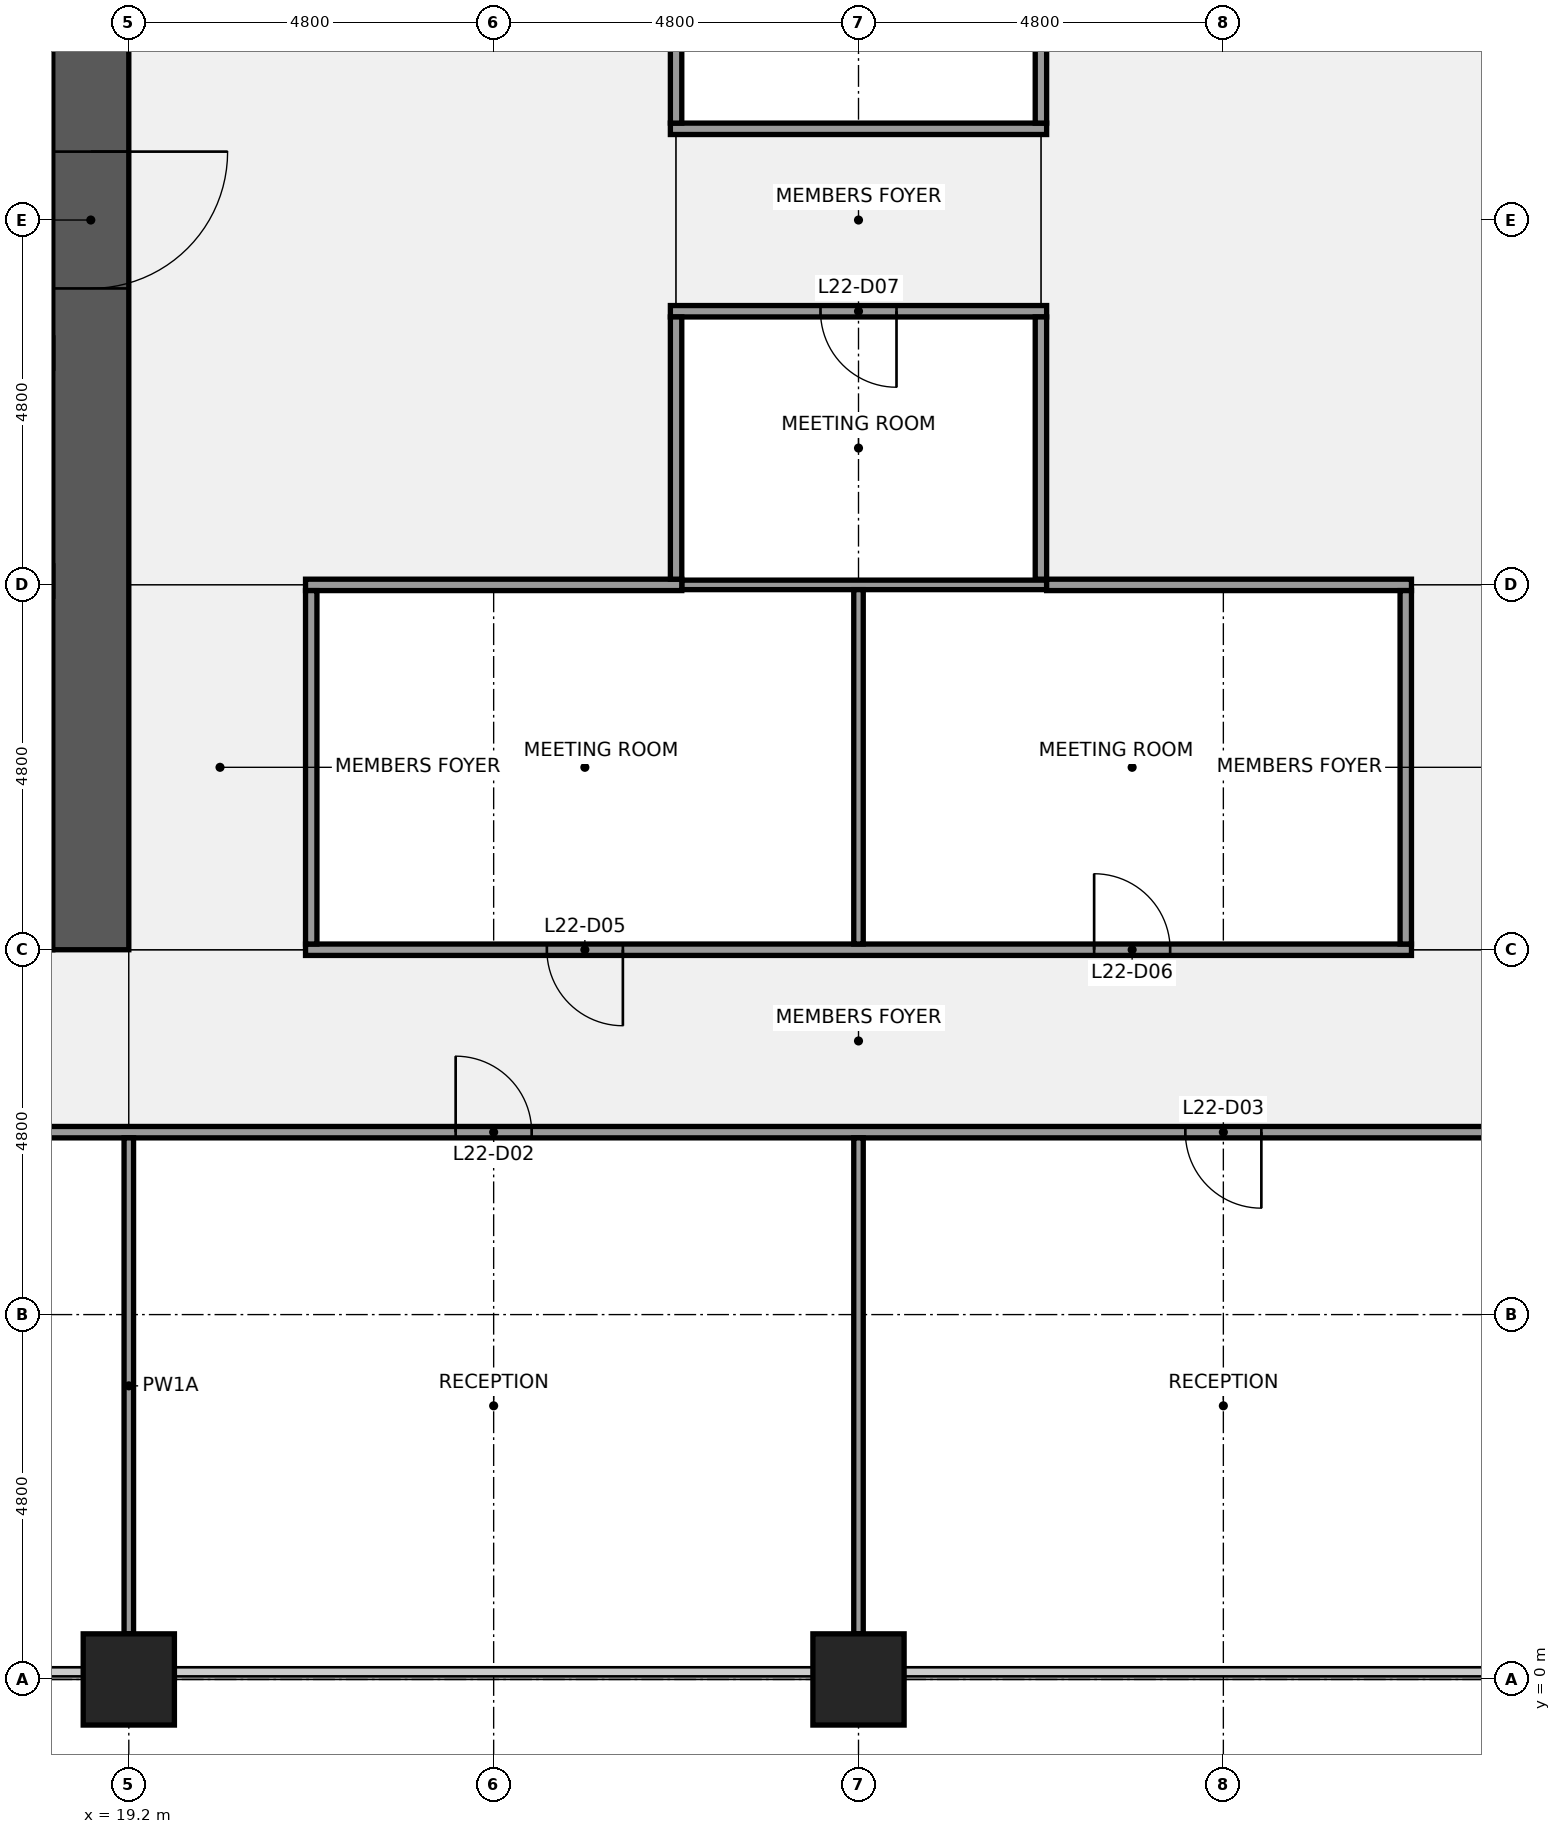
"""IFC4 building model, lengths in metres.
Left out: names, types, materials, properties, quantities, classifications, styles, units other than length and angle.
Written with IfcOpenShell. Run it as: python <this file> out.ifc"""

import sys

from ifc_helpers import new_model, si_unit, direction, frame, frame_2d, origin, origin_2d, place, context, subcontext, project, spatial, rectangle, extrude, element, fill, save


model = new_model("IFC4")
c1 = context("Model", 3, precision=1e-05, world=origin(), true_north=direction((0.0, 1.0)))
c2 = subcontext(c1, "Body", "Model", "MODEL_VIEW")
j1 = project(units=[si_unit("LENGTHUNIT", "METRE"), si_unit("PLANEANGLEUNIT", "RADIAN")], contexts=[c1])
p1 = place(None, origin())
s1 = spatial("IfcSite", under=j1, at=p1, CompositionType="ELEMENT")
p2 = place(p1, origin())
s2 = spatial("IfcBuilding", under=s1, at=p2, CompositionType="ELEMENT")
p3 = place(p2, frame((0.0, 0.0, 108.1)))
s3 = spatial("IfcBuildingStorey", under=s2, at=p3, CompositionType="ELEMENT", Elevation=108.1)
for number, where, z_axis, x_axis in (
    (1, (19.2, 0.0, 0.0), (0.0, 0.0, 1.0), (1.0, 0.0, 0.0)),
    (2, (28.8, 0.0, 0.0), (0.0, 0.0, 1.0), (1.0, 0.0, 0.0)),
):
    element("IfcColumn", number, at=place(p3, frame(where, z_axis=z_axis, x_axis=x_axis)), inside=s3, PredefinedType="COLUMN", context=c2, shape_type="SweptSolid", body=[
        extrude(rectangle(XDim=1.2, YDim=1.2, at=origin_2d()), origin(), (0.0, 0.0, 1.0), 4.0),
    ])
p4 = place(p3, frame((18.2, 10.1, 0.0), z_axis=(0.0, 0.0, 1.0), x_axis=(-1.0, 0.0, 0.0)))
e3 = element("IfcWall", 3, at=p4, inside=s3, PredefinedType="SHEAR", context=c2, shape_type="SweptSolid", body=[
    extrude(rectangle(XDim=8.6, YDim=1.0, at=frame_2d((4.3, 0.0))), origin(), (0.0, 0.0, 1.0), 3.84),
])
p5 = place(p4, frame((0.85, 0.0, 0.0)))
e4 = element("IfcOpeningElement", 4, at=p5, cuts=e3, PredefinedType="OPENING", context=c2, shape_type="SweptSolid", body=[
    extrude(rectangle(XDim=1.1, YDim=2.1, at=frame_2d((0.55, 1.05))), frame((0.0, 0.51, 0.0), z_axis=(0.0, -1.0, 0.0), x_axis=(1.0, 0.0, 0.0)), (0.0, 0.0, 1.0), 1.02),
])
p6 = place(p3, frame((18.7, 38.4, 0.0), z_axis=(0.0, 0.0, 1.0), x_axis=(0.0, -1.0, 0.0)))
e5 = element("IfcWall", 5, at=p6, inside=s3, PredefinedType="SHEAR", context=c2, shape_type="SweptSolid", body=[
    extrude(rectangle(XDim=28.8, YDim=1.0, at=frame_2d((14.4, 0.0))), origin(), (0.0, 0.0, 1.0), 3.84),
])
p7 = place(p6, frame((18.3, 0.0, 0.0)))
e6 = element("IfcOpeningElement", 6, at=p7, cuts=e5, PredefinedType="OPENING", context=c2, shape_type="SweptSolid", body=[
    extrude(rectangle(XDim=1.8, YDim=2.1, at=frame_2d((0.9, 1.05))), frame((0.0, 0.51, 0.0), z_axis=(0.0, -1.0, 0.0), x_axis=(1.0, 0.0, 0.0)), (0.0, 0.0, 1.0), 1.02),
])
p8 = place(p6, frame((8.7, 0.0, 0.0)))
e7 = element("IfcOpeningElement", 7, at=p8, cuts=e5, PredefinedType="OPENING", context=c2, shape_type="SweptSolid", body=[
    extrude(rectangle(XDim=1.8, YDim=2.1, at=frame_2d((0.9, 1.05))), frame((0.0, 0.51, 0.0), z_axis=(0.0, -1.0, 0.0), x_axis=(1.0, 0.0, 0.0)), (0.0, 0.0, 1.0), 1.02),
])
p9 = place(p3, frame((1.0, 14.45, 0.0), z_axis=(0.0, 0.0, 1.0), x_axis=(1.0, 0.0, 0.0)))
e8 = element("IfcWall", 8, at=p9, inside=s3, PredefinedType="SHEAR", context=c2, shape_type="SweptSolid", body=[
    extrude(rectangle(XDim=17.2, YDim=0.4, at=frame_2d((8.6, 0.0))), origin(), (0.0, 0.0, 1.0), 3.84),
])
p10 = place(p3, frame((1.0, 17.45, 0.0), z_axis=(0.0, 0.0, 1.0), x_axis=(1.0, 0.0, 0.0)))
e9 = element("IfcWall", 9, at=p10, inside=s3, PredefinedType="SHEAR", context=c2, shape_type="SweptSolid", body=[
    extrude(rectangle(XDim=17.2, YDim=0.4, at=frame_2d((8.6, 0.0))), origin(), (0.0, 0.0, 1.0), 3.84),
])
p11 = place(p10, frame((1.663, 0.0, 0.0)))
e10 = element("IfcOpeningElement", 10, at=p11, cuts=e9, PredefinedType="OPENING", context=c2, shape_type="SweptSolid", body=[
    extrude(rectangle(XDim=1.0, YDim=2.1, at=frame_2d((0.5, 1.05))), frame((0.0, 0.21, 0.0), z_axis=(0.0, -1.0, 0.0), x_axis=(1.0, 0.0, 0.0)), (0.0, 0.0, 1.0), 0.42),
])
p12 = place(p10, frame((5.7, 0.0, 0.0)))
e11 = element("IfcOpeningElement", 11, at=p12, cuts=e9, PredefinedType="OPENING", context=c2, shape_type="SweptSolid", body=[
    extrude(rectangle(XDim=1.0, YDim=2.1, at=frame_2d((0.5, 1.05))), frame((0.0, 0.21, 0.0), z_axis=(0.0, -1.0, 0.0), x_axis=(1.0, 0.0, 0.0)), (0.0, 0.0, 1.0), 0.42),
])
p13 = place(p10, frame((9.0, 0.0, 0.0)))
e12 = element("IfcOpeningElement", 12, at=p13, cuts=e9, PredefinedType="OPENING", context=c2, shape_type="SweptSolid", body=[
    extrude(rectangle(XDim=1.0, YDim=2.1, at=frame_2d((0.5, 1.05))), frame((0.0, 0.21, 0.0), z_axis=(0.0, -1.0, 0.0), x_axis=(1.0, 0.0, 0.0)), (0.0, 0.0, 1.0), 0.42),
])
p14 = place(p10, frame((11.7, 0.0, 0.0)))
e13 = element("IfcOpeningElement", 13, at=p14, cuts=e9, PredefinedType="OPENING", context=c2, shape_type="SweptSolid", body=[
    extrude(rectangle(XDim=1.0, YDim=2.1, at=frame_2d((0.5, 1.05))), frame((0.0, 0.21, 0.0), z_axis=(0.0, -1.0, 0.0), x_axis=(1.0, 0.0, 0.0)), (0.0, 0.0, 1.0), 0.42),
])
p15 = place(p10, frame((14.837, 0.0, 0.0)))
e14 = element("IfcOpeningElement", 14, at=p15, cuts=e9, PredefinedType="OPENING", context=c2, shape_type="SweptSolid", body=[
    extrude(rectangle(XDim=1.0, YDim=2.1, at=frame_2d((0.5, 1.05))), frame((0.0, 0.21, 0.0), z_axis=(0.0, -1.0, 0.0), x_axis=(1.0, 0.0, 0.0)), (0.0, 0.0, 1.0), 0.42),
])
p16 = place(p3, frame((9.7, 7.2, 0.0), z_axis=(0.0, 0.0, 1.0), x_axis=(1.0, 0.0, 0.0)))
e15 = element("IfcWall", 15, at=p16, inside=s3, PredefinedType="PARTITIONING", context=c2, shape_type="SweptSolid", body=[
    extrude(rectangle(XDim=38.375, YDim=0.15, at=frame_2d((19.188, 0.0))), origin(), (0.0, 0.0, 1.0), 2.936),
])
p17 = place(p16, frame((4.25, 0.0, 0.0)))
e16 = element("IfcOpeningElement", 16, at=p17, cuts=e15, PredefinedType="OPENING", context=c2, shape_type="SweptSolid", body=[
    extrude(rectangle(XDim=1.0, YDim=2.1, at=frame_2d((0.5, 1.05))), frame((0.0, 0.085, 0.0), z_axis=(0.0, -1.0, 0.0), x_axis=(1.0, 0.0, 0.0)), (0.0, 0.0, 1.0), 0.17),
])
p18 = place(p16, frame((13.8, 0.0, 0.0)))
e17 = element("IfcOpeningElement", 17, at=p18, cuts=e15, PredefinedType="OPENING", context=c2, shape_type="SweptSolid", body=[
    extrude(rectangle(XDim=1.0, YDim=2.1, at=frame_2d((0.5, 1.05))), frame((0.0, 0.085, 0.0), z_axis=(0.0, -1.0, 0.0), x_axis=(1.0, 0.0, 0.0)), (0.0, 0.0, 1.0), 0.17),
])
p19 = place(p16, frame((23.4, 0.0, 0.0)))
e18 = element("IfcOpeningElement", 18, at=p19, cuts=e15, PredefinedType="OPENING", context=c2, shape_type="SweptSolid", body=[
    extrude(rectangle(XDim=1.0, YDim=2.1, at=frame_2d((0.5, 1.05))), frame((0.0, 0.085, 0.0), z_axis=(0.0, -1.0, 0.0), x_axis=(1.0, 0.0, 0.0)), (0.0, 0.0, 1.0), 0.17),
])
p20 = place(p16, frame((33.0, 0.0, 0.0)))
e19 = element("IfcOpeningElement", 19, at=p20, cuts=e15, PredefinedType="OPENING", context=c2, shape_type="SweptSolid", body=[
    extrude(rectangle(XDim=1.0, YDim=2.1, at=frame_2d((0.5, 1.05))), frame((0.0, 0.085, 0.0), z_axis=(0.0, -1.0, 0.0), x_axis=(1.0, 0.0, 0.0)), (0.0, 0.0, 1.0), 0.17),
])
p21 = place(p3, frame((21.525, 9.6, 0.0), z_axis=(0.0, 0.0, 1.0), x_axis=(1.0, 0.0, 0.0)))
e20 = element("IfcWall", 20, at=p21, inside=s3, PredefinedType="PARTITIONING", context=c2, shape_type="SweptSolid", body=[
    extrude(rectangle(XDim=14.55, YDim=0.15, at=frame_2d((7.275, 0.0))), origin(), (0.0, 0.0, 1.0), 2.936),
])
p22 = place(p21, frame((3.175, 0.0, 0.0)))
e21 = element("IfcOpeningElement", 21, at=p22, cuts=e20, PredefinedType="OPENING", context=c2, shape_type="SweptSolid", body=[
    extrude(rectangle(XDim=1.0, YDim=2.1, at=frame_2d((0.5, 1.05))), frame((0.0, 0.085, 0.0), z_axis=(0.0, -1.0, 0.0), x_axis=(1.0, 0.0, 0.0)), (0.0, 0.0, 1.0), 0.17),
])
p23 = place(p21, frame((10.375, 0.0, 0.0)))
e22 = element("IfcOpeningElement", 22, at=p23, cuts=e20, PredefinedType="OPENING", context=c2, shape_type="SweptSolid", body=[
    extrude(rectangle(XDim=1.0, YDim=2.1, at=frame_2d((0.5, 1.05))), frame((0.0, 0.085, 0.0), z_axis=(0.0, -1.0, 0.0), x_axis=(1.0, 0.0, 0.0)), (0.0, 0.0, 1.0), 0.17),
])
p24 = place(p3, frame((26.475, 14.4, 0.0), z_axis=(0.0, 0.0, 1.0), x_axis=(1.0, 0.0, 0.0)))
e23 = element("IfcWall", 23, at=p24, inside=s3, PredefinedType="PARTITIONING", context=c2, shape_type="SweptSolid", body=[
    extrude(rectangle(XDim=4.8, YDim=0.125, at=frame_2d((2.4, 0.0))), origin(), (0.0, 0.0, 1.0), 2.936),
])
p25 = place(p3, frame((21.525, 14.4, 0.0), z_axis=(0.0, 0.0, 1.0), x_axis=(1.0, 0.0, 0.0)))
e24 = element("IfcWall", 24, at=p25, inside=s3, PredefinedType="PARTITIONING", context=c2, shape_type="SweptSolid", body=[
    extrude(rectangle(XDim=4.95, YDim=0.15, at=frame_2d((2.475, 0.0))), origin(), (0.0, 0.0, 1.0), 2.936),
])
p26 = place(p3, frame((31.275, 14.4, 0.0), z_axis=(0.0, 0.0, 1.0), x_axis=(1.0, 0.0, 0.0)))
e25 = element("IfcWall", 25, at=p26, inside=s3, PredefinedType="PARTITIONING", context=c2, shape_type="SweptSolid", body=[
    extrude(rectangle(XDim=4.8, YDim=0.15, at=frame_2d((2.4, 0.0))), origin(), (0.0, 0.0, 1.0), 2.936),
])
p27 = place(p3, frame((26.325, 18.0, 0.0), z_axis=(0.0, 0.0, 1.0), x_axis=(1.0, 0.0, 0.0)))
e26 = element("IfcWall", 26, at=p27, inside=s3, PredefinedType="PARTITIONING", context=c2, shape_type="SweptSolid", body=[
    extrude(rectangle(XDim=4.95, YDim=0.15, at=frame_2d((2.475, 0.0))), origin(), (0.0, 0.0, 1.0), 2.936),
])
p28 = place(p27, frame((1.975, 0.0, 0.0)))
e27 = element("IfcOpeningElement", 27, at=p28, cuts=e26, PredefinedType="OPENING", context=c2, shape_type="SweptSolid", body=[
    extrude(rectangle(XDim=1.0, YDim=2.1, at=frame_2d((0.5, 1.05))), frame((0.0, 0.085, 0.0), z_axis=(0.0, -1.0, 0.0), x_axis=(1.0, 0.0, 0.0)), (0.0, 0.0, 1.0), 0.17),
])
p29 = place(p3, frame((26.325, 20.4, 0.0), z_axis=(0.0, 0.0, 1.0), x_axis=(1.0, 0.0, 0.0)))
e28 = element("IfcWall", 28, at=p29, inside=s3, PredefinedType="PARTITIONING", context=c2, shape_type="SweptSolid", body=[
    extrude(rectangle(XDim=4.95, YDim=0.15, at=frame_2d((2.475, 0.0))), origin(), (0.0, 0.0, 1.0), 2.936),
])
p30 = place(p3, frame((19.2, 0.6, 0.0), z_axis=(0.0, 0.0, 1.0), x_axis=(0.0, 1.0, 0.0)))
e29 = element("IfcWall", 29, at=p30, inside=s3, PredefinedType="PARTITIONING", context=c2, shape_type="SweptSolid", body=[
    extrude(rectangle(XDim=6.525, YDim=0.125, at=frame_2d((3.262, 0.0))), origin(), (0.0, 0.0, 1.0), 2.936),
])
p31 = place(p3, frame((21.6, 9.675, 0.0), z_axis=(0.0, 0.0, 1.0), x_axis=(0.0, 1.0, 0.0)))
e30 = element("IfcWall", 30, at=p31, inside=s3, PredefinedType="PARTITIONING", context=c2, shape_type="SweptSolid", body=[
    extrude(rectangle(XDim=4.65, YDim=0.15, at=frame_2d((2.325, 0.0))), origin(), (0.0, 0.0, 1.0), 2.936),
])
p32 = place(p3, frame((26.4, 14.475, 0.0), z_axis=(0.0, 0.0, 1.0), x_axis=(0.0, 1.0, 0.0)))
e31 = element("IfcWall", 31, at=p32, inside=s3, PredefinedType="PARTITIONING", context=c2, shape_type="SweptSolid", body=[
    extrude(rectangle(XDim=3.45, YDim=0.15, at=frame_2d((1.725, 0.0))), origin(), (0.0, 0.0, 1.0), 2.936),
])
p33 = place(p3, frame((26.4, 20.475, 0.0), z_axis=(0.0, 0.0, 1.0), x_axis=(0.0, 1.0, 0.0)))
e32 = element("IfcWall", 32, at=p33, inside=s3, PredefinedType="PARTITIONING", context=c2, shape_type="SweptSolid", body=[
    extrude(rectangle(XDim=13.05, YDim=0.15, at=frame_2d((6.525, 0.0))), origin(), (0.0, 0.0, 1.0), 2.936),
])
p34 = place(p33, frame((6.025, 0.0, 0.0)))
e33 = element("IfcOpeningElement", 33, at=p34, cuts=e32, PredefinedType="OPENING", context=c2, shape_type="SweptSolid", body=[
    extrude(rectangle(XDim=1.0, YDim=2.1, at=frame_2d((0.5, 1.05))), frame((0.0, 0.085, 0.0), z_axis=(0.0, -1.0, 0.0), x_axis=(1.0, 0.0, 0.0)), (0.0, 0.0, 1.0), 0.17),
])
p35 = place(p3, frame((28.8, 0.6, 0.0), z_axis=(0.0, 0.0, 1.0), x_axis=(0.0, 1.0, 0.0)))
e34 = element("IfcWall", 34, at=p35, inside=s3, PredefinedType="PARTITIONING", context=c2, shape_type="SweptSolid", body=[
    extrude(rectangle(XDim=6.525, YDim=0.125, at=frame_2d((3.262, 0.0))), origin(), (0.0, 0.0, 1.0), 2.936),
])
p36 = place(p3, frame((28.8, 9.675, 0.0), z_axis=(0.0, 0.0, 1.0), x_axis=(0.0, 1.0, 0.0)))
e35 = element("IfcWall", 35, at=p36, inside=s3, PredefinedType="PARTITIONING", context=c2, shape_type="SweptSolid", body=[
    extrude(rectangle(XDim=4.662, YDim=0.125, at=frame_2d((2.331, 0.0))), origin(), (0.0, 0.0, 1.0), 2.936),
])
p37 = place(p3, frame((31.2, 14.475, 0.0), z_axis=(0.0, 0.0, 1.0), x_axis=(0.0, 1.0, 0.0)))
e36 = element("IfcWall", 36, at=p37, inside=s3, PredefinedType="PARTITIONING", context=c2, shape_type="SweptSolid", body=[
    extrude(rectangle(XDim=3.45, YDim=0.15, at=frame_2d((1.725, 0.0))), origin(), (0.0, 0.0, 1.0), 2.936),
])
p38 = place(p3, frame((31.2, 20.475, 0.0), z_axis=(0.0, 0.0, 1.0), x_axis=(0.0, 1.0, 0.0)))
e37 = element("IfcWall", 37, at=p38, inside=s3, PredefinedType="PARTITIONING", context=c2, shape_type="SweptSolid", body=[
    extrude(rectangle(XDim=13.05, YDim=0.15, at=frame_2d((6.525, 0.0))), origin(), (0.0, 0.0, 1.0), 2.936),
])
p39 = place(p3, frame((36.0, 9.675, 0.0), z_axis=(0.0, 0.0, 1.0), x_axis=(0.0, 1.0, 0.0)))
e38 = element("IfcWall", 38, at=p39, inside=s3, PredefinedType="PARTITIONING", context=c2, shape_type="SweptSolid", body=[
    extrude(rectangle(XDim=4.65, YDim=0.15, at=frame_2d((2.325, 0.0))), origin(), (0.0, 0.0, 1.0), 2.936),
])
for number, where, z_axis, x_axis in (
    (39, (19.2, -1.05, 0.0), (0.0, 0.0, 1.0), (1.0, 0.0, 0.0)),
    (40, (38.4, -1.05, 0.0), (0.0, 0.0, 1.0), (1.0, 0.0, 0.0)),
):
    element("IfcColumn", number, at=place(p3, frame(where, z_axis=z_axis, x_axis=x_axis)), inside=s3, PredefinedType="PILASTER", context=c2, shape_type="SweptSolid", body=[
        extrude(rectangle(XDim=3.6, YDim=0.9, at=origin_2d()), origin(), (0.0, 0.0, 1.0), 4.0),
    ])
p40 = place(p7, origin())
e41 = element("IfcDoor", 41, at=p40, inside=s3, OperationType="DOUBLE_DOOR_SINGLE_SWING", PredefinedType="DOOR", context=c2, shape_type="SweptSolid", body=[
    extrude(rectangle(XDim=1.8, YDim=2.1, at=frame_2d((0.9, 1.05))), frame((0.0, 0.025, 0.0), z_axis=(0.0, -1.0, 0.0), x_axis=(1.0, 0.0, 0.0)), (0.0, 0.0, 1.0), 0.05),
])
fill(e6, e41)
p41 = place(p18, origin())
e42 = element("IfcDoor", 42, at=p41, inside=s3, OperationType="SINGLE_SWING_LEFT", PredefinedType="DOOR", context=c2, shape_type="SweptSolid", body=[
    extrude(rectangle(XDim=1.0, YDim=2.1, at=frame_2d((0.5, 1.05))), frame((0.0, 0.025, 0.0), z_axis=(0.0, -1.0, 0.0), x_axis=(1.0, 0.0, 0.0)), (0.0, 0.0, 1.0), 0.05),
])
fill(e17, e42)
p42 = place(p19, origin())
e43 = element("IfcDoor", 43, at=p42, inside=s3, OperationType="SINGLE_SWING_RIGHT", PredefinedType="DOOR", context=c2, shape_type="SweptSolid", body=[
    extrude(rectangle(XDim=1.0, YDim=2.1, at=frame_2d((0.5, 1.05))), frame((0.0, 0.025, 0.0), z_axis=(0.0, -1.0, 0.0), x_axis=(1.0, 0.0, 0.0)), (0.0, 0.0, 1.0), 0.05),
])
fill(e18, e43)
p43 = place(p22, origin())
e44 = element("IfcDoor", 44, at=p43, inside=s3, OperationType="SINGLE_SWING_RIGHT", PredefinedType="DOOR", context=c2, shape_type="SweptSolid", body=[
    extrude(rectangle(XDim=1.0, YDim=2.1, at=frame_2d((0.5, 1.05))), frame((0.0, 0.025, 0.0), z_axis=(0.0, -1.0, 0.0), x_axis=(1.0, 0.0, 0.0)), (0.0, 0.0, 1.0), 0.05),
])
fill(e21, e44)
p44 = place(p23, origin())
e45 = element("IfcDoor", 45, at=p44, inside=s3, OperationType="SINGLE_SWING_LEFT", PredefinedType="DOOR", context=c2, shape_type="SweptSolid", body=[
    extrude(rectangle(XDim=1.0, YDim=2.1, at=frame_2d((0.5, 1.05))), frame((0.0, 0.025, 0.0), z_axis=(0.0, -1.0, 0.0), x_axis=(1.0, 0.0, 0.0)), (0.0, 0.0, 1.0), 0.05),
])
fill(e22, e45)
p45 = place(p28, origin())
e46 = element("IfcDoor", 46, at=p45, inside=s3, OperationType="SINGLE_SWING_RIGHT", PredefinedType="DOOR", context=c2, shape_type="SweptSolid", body=[
    extrude(rectangle(XDim=1.0, YDim=2.1, at=frame_2d((0.5, 1.05))), frame((0.0, 0.025, 0.0), z_axis=(0.0, -1.0, 0.0), x_axis=(1.0, 0.0, 0.0)), (0.0, 0.0, 1.0), 0.05),
])
fill(e27, e46)
save(model, sys.argv[1])
